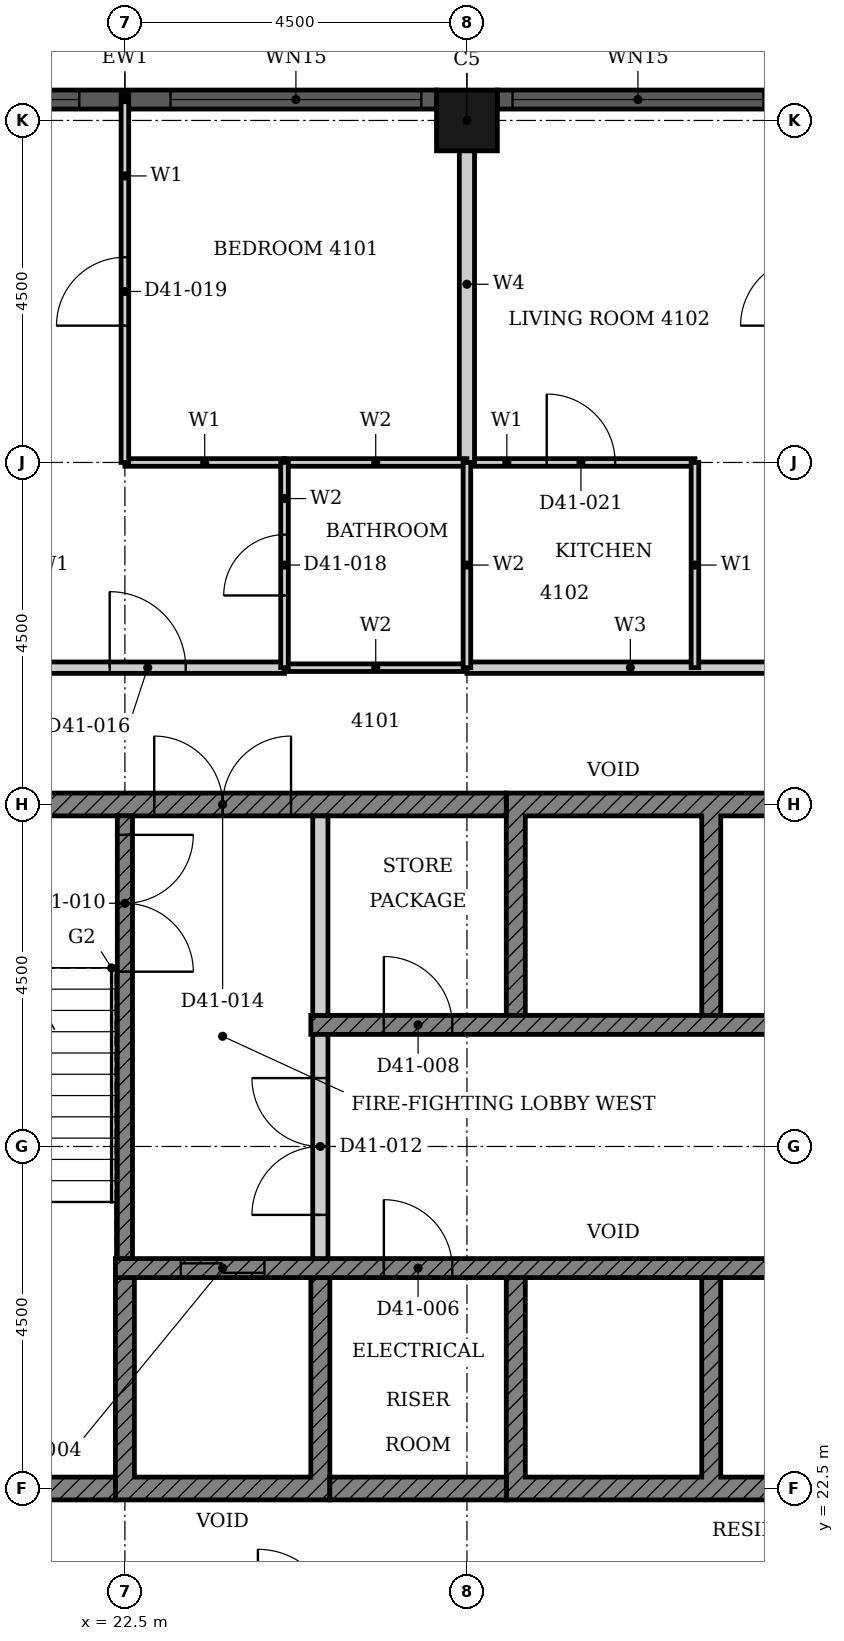
"""IFC4 building model, lengths in metres.
Left out: names, types, materials, properties, quantities, classifications, styles, units other than length and angle.
Written with IfcOpenShell. Run it as: python <this file> out.ifc"""

import sys

from ifc_helpers import new_model, si_unit, direction, frame, frame_2d, origin, origin_2d, place, context, subcontext, project, spatial, polyline, rectangle, hollow_rectangle, outline, extrude, element, fill, save


model = new_model("IFC4")
c1 = context("Model", 3, precision=1e-05, world=origin(), true_north=direction((0.0, 1.0)))
c2 = subcontext(c1, "Body", "Model", "MODEL_VIEW")
j1 = project(units=[si_unit("LENGTHUNIT", "METRE"), si_unit("PLANEANGLEUNIT", "RADIAN")], contexts=[c1])
p1 = place(None, origin())
s1 = spatial("IfcSite", under=j1, at=p1, CompositionType="ELEMENT")
p2 = place(p1, origin())
s2 = spatial("IfcBuilding", under=s1, at=p2, CompositionType="ELEMENT")
p3 = place(p2, frame((0.0, 0.0, 165.4)))
s3 = spatial("IfcBuildingStorey", under=s2, at=p3, CompositionType="ELEMENT", Elevation=165.4)
p4 = place(p3, frame((27.0, 40.5, 0.0), z_axis=(0.0, 0.0, 1.0), x_axis=(1.0, 0.0, 0.0)))
e1 = element("IfcColumn", 1, at=p4, inside=s3, PredefinedType="COLUMN", context=c2, shape_type="SweptSolid", body=[
    extrude(hollow_rectangle(XDim=0.8, YDim=0.8, WallThickness=0.025, at=origin_2d()), origin(), (0.0, 0.0, 1.0), 3.7),
])
p5 = place(p3, frame((35.6, 40.775, 0.0), z_axis=(0.0, 0.0, 1.0), x_axis=(-1.0, 0.0, 0.0)))
e2 = element("IfcWall", 2, at=p5, inside=s3, PredefinedType="SOLIDWALL", context=c2, shape_type="SweptSolid", body=[
    extrude(rectangle(XDim=8.2, YDim=0.25, at=frame_2d((4.1, 0.0))), origin(), (0.0, 0.0, 1.0), 3.7),
])
p6 = place(p5, frame((0.2, 0.0, 0.45)))
e3 = element("IfcOpeningElement", 3, at=p6, cuts=e2, PredefinedType="OPENING", context=c2, shape_type="SweptSolid", body=[
    extrude(rectangle(XDim=3.3, YDim=2.3, at=frame_2d((1.65, 1.15))), frame((0.0, 0.135, 0.0), z_axis=(0.0, -1.0, 0.0), x_axis=(1.0, 0.0, 0.0)), (0.0, 0.0, 1.0), 0.27),
])
p7 = place(p5, frame((4.7, 0.0, 0.45)))
e4 = element("IfcOpeningElement", 4, at=p7, cuts=e2, PredefinedType="OPENING", context=c2, shape_type="SweptSolid", body=[
    extrude(rectangle(XDim=3.3, YDim=2.3, at=frame_2d((1.65, 1.15))), frame((0.0, 0.135, 0.0), z_axis=(0.0, -1.0, 0.0), x_axis=(1.0, 0.0, 0.0)), (0.0, 0.0, 1.0), 0.27),
])
p8 = place(p3, frame((26.6, 40.775, 0.0), z_axis=(0.0, 0.0, 1.0), x_axis=(-1.0, 0.0, 0.0)))
e5 = element("IfcWall", 5, at=p8, inside=s3, PredefinedType="SOLIDWALL", context=c2, shape_type="SweptSolid", body=[
    extrude(rectangle(XDim=8.2, YDim=0.25, at=frame_2d((4.1, 0.0))), origin(), (0.0, 0.0, 1.0), 3.7),
])
p9 = place(p8, frame((0.2, 0.0, 0.45)))
e6 = element("IfcOpeningElement", 6, at=p9, cuts=e5, PredefinedType="OPENING", context=c2, shape_type="SweptSolid", body=[
    extrude(rectangle(XDim=3.3, YDim=2.3, at=frame_2d((1.65, 1.15))), frame((0.0, 0.135, 0.0), z_axis=(0.0, -1.0, 0.0), x_axis=(1.0, 0.0, 0.0)), (0.0, 0.0, 1.0), 0.27),
])
p10 = place(p8, frame((4.7, 0.0, 0.45)))
e7 = element("IfcOpeningElement", 7, at=p10, cuts=e5, PredefinedType="OPENING", context=c2, shape_type="SweptSolid", body=[
    extrude(rectangle(XDim=3.3, YDim=2.3, at=frame_2d((1.65, 1.15))), frame((0.0, 0.135, 0.0), z_axis=(0.0, -1.0, 0.0), x_axis=(1.0, 0.0, 0.0)), (0.0, 0.0, 1.0), 0.27),
])
p11 = place(p3, origin())
e8 = element("IfcWall", 8, at=p11, inside=s3, PredefinedType="SHEAR", context=c2, shape_type="SweptSolid", body=[
    extrude(outline(polyline([(22.375, 22.35), (25.197, 22.35), (25.197, 25.275), (24.947, 25.275), (24.947, 22.65), (22.625, 22.65), (22.625, 25.275), (22.375, 25.275), (22.375, 22.35)])), origin(), (0.0, 0.0, 1.0), 3.4),
])
p12 = place(p3, origin())
e9 = element("IfcWall", 9, at=p12, inside=s3, PredefinedType="SHEAR", context=c2, shape_type="SweptSolid", body=[
    extrude(outline(polyline([(27.518, 22.35), (32.911, 22.35), (32.911, 25.275), (32.661, 25.275), (32.661, 22.65), (30.339, 22.65), (30.339, 25.275), (30.089, 25.275), (30.089, 22.65), (27.768, 22.65), (27.768, 25.275), (27.518, 25.275), (27.518, 22.35)])), origin(), (0.0, 0.0, 1.0), 3.4),
])
p13 = place(p3, origin())
e10 = element("IfcWall", 10, at=p13, inside=s3, PredefinedType="SHEAR", context=c2, shape_type="SweptSolid", body=[
    extrude(outline(polyline([(27.518, 28.725), (27.768, 28.725), (27.768, 31.35), (30.089, 31.35), (30.089, 28.725), (30.339, 28.725), (30.339, 31.35), (32.661, 31.35), (32.661, 28.725), (32.911, 28.725), (32.911, 31.65), (27.518, 31.65), (27.518, 28.725)])), origin(), (0.0, 0.0, 1.0), 3.4),
])
p14 = place(p3, frame((18.15, 22.5, 0.0), z_axis=(0.0, 0.0, 1.0), x_axis=(1.0, 0.0, 0.0)))
e11 = element("IfcWall", 11, at=p14, inside=s3, PredefinedType="SHEAR", context=c2, shape_type="SweptSolid", body=[
    extrude(rectangle(XDim=4.225, YDim=0.3, at=frame_2d((2.113, 0.0))), origin(), (0.0, 0.0, 1.0), 3.4),
])
p15 = place(p3, frame((25.197, 22.5, 0.0), z_axis=(0.0, 0.0, 1.0), x_axis=(1.0, 0.0, 0.0)))
e12 = element("IfcWall", 12, at=p15, inside=s3, PredefinedType="SHEAR", context=c2, shape_type="SweptSolid", body=[
    extrude(rectangle(XDim=2.321, YDim=0.3, at=frame_2d((1.161, 0.0))), origin(), (0.0, 0.0, 1.0), 3.4),
])
p16 = place(p3, frame((18.15, 31.5, 0.0), z_axis=(0.0, 0.0, 1.0), x_axis=(1.0, 0.0, 0.0)))
e13 = element("IfcWall", 13, at=p16, inside=s3, PredefinedType="SHEAR", context=c2, shape_type="SweptSolid", body=[
    extrude(rectangle(XDim=9.368, YDim=0.3, at=frame_2d((4.684, 0.0))), origin(), (0.0, 0.0, 1.0), 3.4),
])
p17 = place(p16, frame((4.736, 0.0, 0.0)))
e14 = element("IfcOpeningElement", 14, at=p17, cuts=e13, PredefinedType="OPENING", context=c2, shape_type="SweptSolid", body=[
    extrude(rectangle(XDim=1.8, YDim=2.1, at=frame_2d((0.9, 1.05))), frame((0.0, 0.16, 0.0), z_axis=(0.0, -1.0, 0.0), x_axis=(1.0, 0.0, 0.0)), (0.0, 0.0, 1.0), 0.32),
])
p18 = place(p3, frame((22.375, 25.4, 0.0), z_axis=(0.0, 0.0, 1.0), x_axis=(1.0, 0.0, 0.0)))
e15 = element("IfcWall", 15, at=p18, inside=s3, PredefinedType="SHEAR", context=c2, shape_type="SweptSolid", body=[
    extrude(rectangle(XDim=15.678, YDim=0.25, at=frame_2d((7.839, 0.0))), origin(), (0.0, 0.0, 1.0), 3.4),
])
p19 = place(p18, frame((8.575, 0.0, 0.0)))
e16 = element("IfcOpeningElement", 16, at=p19, cuts=e15, PredefinedType="OPENING", context=c2, shape_type="SweptSolid", body=[
    extrude(rectangle(XDim=1.1, YDim=2.1, at=frame_2d((0.55, 1.05))), frame((0.0, 0.135, 0.0), z_axis=(0.0, -1.0, 0.0), x_axis=(1.0, 0.0, 0.0)), (0.0, 0.0, 1.0), 0.27),
])
p20 = place(p18, frame((0.861, 0.0, 0.0)))
e17 = element("IfcOpeningElement", 17, at=p20, cuts=e15, PredefinedType="OPENING", context=c2, shape_type="SweptSolid", body=[
    extrude(rectangle(XDim=1.1, YDim=2.1, at=frame_2d((0.55, 1.05))), frame((0.0, 0.135, 0.0), z_axis=(0.0, -1.0, 0.0), x_axis=(1.0, 0.0, 0.0)), (0.0, 0.0, 1.0), 0.27),
])
p21 = place(p18, frame((3.532, 0.0, 0.0)))
e18 = element("IfcOpeningElement", 18, at=p21, cuts=e15, PredefinedType="OPENING", context=c2, shape_type="SweptSolid", body=[
    extrude(rectangle(XDim=0.9, YDim=2.1, at=frame_2d((0.45, 1.05))), frame((0.0, 0.135, 0.0), z_axis=(0.0, -1.0, 0.0), x_axis=(1.0, 0.0, 0.0)), (0.0, 0.0, 1.0), 0.27),
])
p22 = place(p18, frame((12.532, 0.0, 0.0)))
e19 = element("IfcOpeningElement", 19, at=p22, cuts=e15, PredefinedType="OPENING", context=c2, shape_type="SweptSolid", body=[
    extrude(rectangle(XDim=0.9, YDim=2.1, at=frame_2d((0.45, 1.05))), frame((0.0, 0.135, 0.0), z_axis=(0.0, -1.0, 0.0), x_axis=(1.0, 0.0, 0.0)), (0.0, 0.0, 1.0), 0.27),
])
p23 = place(p3, frame((24.947, 28.6, 0.0), z_axis=(0.0, 0.0, 1.0), x_axis=(1.0, 0.0, 0.0)))
e20 = element("IfcWall", 20, at=p23, inside=s3, PredefinedType="SHEAR", context=c2, shape_type="SweptSolid", body=[
    extrude(rectangle(XDim=15.678, YDim=0.25, at=frame_2d((7.839, 0.0))), origin(), (0.0, 0.0, 1.0), 3.4),
])
p24 = place(p23, frame((6.004, 0.0, 0.0)))
e21 = element("IfcOpeningElement", 21, at=p24, cuts=e20, PredefinedType="OPENING", context=c2, shape_type="SweptSolid", body=[
    extrude(rectangle(XDim=1.1, YDim=2.1, at=frame_2d((0.55, 1.05))), frame((0.0, 0.135, 0.0), z_axis=(0.0, -1.0, 0.0), x_axis=(1.0, 0.0, 0.0)), (0.0, 0.0, 1.0), 0.27),
])
p25 = place(p23, frame((11.146, 0.0, 0.0)))
e22 = element("IfcOpeningElement", 22, at=p25, cuts=e20, PredefinedType="OPENING", context=c2, shape_type="SweptSolid", body=[
    extrude(rectangle(XDim=1.1, YDim=2.1, at=frame_2d((0.55, 1.05))), frame((0.0, 0.135, 0.0), z_axis=(0.0, -1.0, 0.0), x_axis=(1.0, 0.0, 0.0)), (0.0, 0.0, 1.0), 0.27),
])
p26 = place(p23, frame((13.718, 0.0, 0.0)))
e23 = element("IfcOpeningElement", 23, at=p26, cuts=e20, PredefinedType="OPENING", context=c2, shape_type="SweptSolid", body=[
    extrude(rectangle(XDim=1.1, YDim=2.1, at=frame_2d((0.55, 1.05))), frame((0.0, 0.135, 0.0), z_axis=(0.0, -1.0, 0.0), x_axis=(1.0, 0.0, 0.0)), (0.0, 0.0, 1.0), 0.27),
])
p27 = place(p23, frame((0.961, 0.0, 0.0)))
e24 = element("IfcOpeningElement", 24, at=p27, cuts=e20, PredefinedType="OPENING", context=c2, shape_type="SweptSolid", body=[
    extrude(rectangle(XDim=0.9, YDim=2.1, at=frame_2d((0.45, 1.05))), frame((0.0, 0.135, 0.0), z_axis=(0.0, -1.0, 0.0), x_axis=(1.0, 0.0, 0.0)), (0.0, 0.0, 1.0), 0.27),
])
p28 = place(p23, frame((8.675, 0.0, 0.0)))
e25 = element("IfcOpeningElement", 25, at=p28, cuts=e20, PredefinedType="OPENING", context=c2, shape_type="SweptSolid", body=[
    extrude(rectangle(XDim=0.9, YDim=2.1, at=frame_2d((0.45, 1.05))), frame((0.0, 0.135, 0.0), z_axis=(0.0, -1.0, 0.0), x_axis=(1.0, 0.0, 0.0)), (0.0, 0.0, 1.0), 0.27),
])
p29 = place(p3, frame((25.072, 28.725, 0.0), z_axis=(0.0, 0.0, 1.0), x_axis=(0.0, 1.0, 0.0)))
e26 = element("IfcWall", 26, at=p29, inside=s3, PredefinedType="PARTITIONING", context=c2, shape_type="SweptSolid", body=[
    extrude(rectangle(XDim=2.625, YDim=0.2, at=frame_2d((1.312, 0.0))), origin(), (0.0, 0.0, 1.0), 3.4),
])
p30 = place(p3, frame((22.5, 31.35, 0.0), z_axis=(0.0, 0.0, 1.0), x_axis=(0.0, -1.0, 0.0)))
e27 = element("IfcWall", 27, at=p30, inside=s3, PredefinedType="SHEAR", context=c2, shape_type="SweptSolid", body=[
    extrude(rectangle(XDim=5.825, YDim=0.2, at=frame_2d((2.913, 0.0))), origin(), (0.0, 0.0, 1.0), 3.4),
])
p31 = place(p30, frame((0.25, 0.0, 0.0)))
e28 = element("IfcOpeningElement", 28, at=p31, cuts=e27, PredefinedType="OPENING", context=c2, shape_type="SweptSolid", body=[
    extrude(rectangle(XDim=1.8, YDim=2.1, at=frame_2d((0.9, 1.05))), frame((0.0, 0.11, 0.0), z_axis=(0.0, -1.0, 0.0), x_axis=(1.0, 0.0, 0.0)), (0.0, 0.0, 1.0), 0.22),
])
p32 = place(p3, frame((25.072, 25.525, 0.0), z_axis=(0.0, 0.0, 1.0), x_axis=(0.0, 1.0, 0.0)))
e29 = element("IfcWall", 29, at=p32, inside=s3, PredefinedType="PARTITIONING", context=c2, shape_type="SweptSolid", body=[
    extrude(rectangle(XDim=2.95, YDim=0.2, at=frame_2d((1.475, 0.0))), origin(), (0.0, 0.0, 1.0), 3.4),
])
p33 = place(p32, frame((0.575, 0.0, 0.0)))
e30 = element("IfcOpeningElement", 30, at=p33, cuts=e29, PredefinedType="OPENING", context=c2, shape_type="SweptSolid", body=[
    extrude(rectangle(XDim=1.8, YDim=2.1, at=frame_2d((0.9, 1.05))), frame((0.0, 0.11, 0.0), z_axis=(0.0, -1.0, 0.0), x_axis=(1.0, 0.0, 0.0)), (0.0, 0.0, 1.0), 0.22),
])
p34 = place(p3, frame((18.0, 33.3, 0.0), z_axis=(0.0, 0.0, 1.0), x_axis=(1.0, 0.0, 0.0)))
e31 = element("IfcWall", 31, at=p34, inside=s3, PredefinedType="PARTITIONING", context=c2, shape_type="SweptSolid", body=[
    extrude(rectangle(XDim=6.6, YDim=0.15, at=frame_2d((3.3, 0.0))), origin(), (0.0, 0.0, 1.0), 3.4),
])
p35 = place(p34, frame((4.3, 0.0, 0.0)))
e32 = element("IfcOpeningElement", 32, at=p35, cuts=e31, PredefinedType="OPENING", context=c2, shape_type="SweptSolid", body=[
    extrude(rectangle(XDim=1.0, YDim=2.2, at=frame_2d((0.5, 1.1))), frame((0.0, 0.085, 0.0), z_axis=(0.0, -1.0, 0.0), x_axis=(1.0, 0.0, 0.0)), (0.0, 0.0, 1.0), 0.17),
])
p36 = place(p3, frame((27.0, 33.3, 0.0), z_axis=(0.0, 0.0, 1.0), x_axis=(1.0, 0.0, 0.0)))
e33 = element("IfcWall", 33, at=p36, inside=s3, PredefinedType="PARTITIONING", context=c2, shape_type="SweptSolid", body=[
    extrude(rectangle(XDim=6.6, YDim=0.15, at=frame_2d((3.3, 0.0))), origin(), (0.0, 0.0, 1.0), 3.4),
])
p37 = place(p36, frame((4.3, 0.0, 0.0)))
e34 = element("IfcOpeningElement", 34, at=p37, cuts=e33, PredefinedType="OPENING", context=c2, shape_type="SweptSolid", body=[
    extrude(rectangle(XDim=1.0, YDim=2.2, at=frame_2d((0.5, 1.1))), frame((0.0, 0.085, 0.0), z_axis=(0.0, -1.0, 0.0), x_axis=(1.0, 0.0, 0.0)), (0.0, 0.0, 1.0), 0.17),
])
p38 = place(p3, frame((22.5, 36.0, 0.0), z_axis=(0.0, 0.0, 1.0), x_axis=(1.0, 0.0, 0.0)))
e35 = element("IfcWall", 35, at=p38, inside=s3, PredefinedType="PARTITIONING", context=c2, shape_type="SweptSolid", body=[
    extrude(rectangle(XDim=2.1, YDim=0.1, at=frame_2d((1.05, 0.0))), origin(), (0.0, 0.0, 1.0), 3.4),
])
p39 = place(p3, frame((27.0, 36.0, 0.0), z_axis=(0.0, 0.0, 1.0), x_axis=(1.0, 0.0, 0.0)))
e36 = element("IfcWall", 36, at=p39, inside=s3, PredefinedType="PARTITIONING", context=c2, shape_type="SweptSolid", body=[
    extrude(rectangle(XDim=3.0, YDim=0.1, at=frame_2d((1.5, 0.0))), origin(), (0.0, 0.0, 1.0), 3.4),
])
p40 = place(p39, frame((1.05, 0.0, 0.0)))
e37 = element("IfcOpeningElement", 37, at=p40, cuts=e36, PredefinedType="OPENING", context=c2, shape_type="SweptSolid", body=[
    extrude(rectangle(XDim=0.9, YDim=2.1, at=frame_2d((0.45, 1.05))), frame((0.0, 0.06, 0.0), z_axis=(0.0, -1.0, 0.0), x_axis=(1.0, 0.0, 0.0)), (0.0, 0.0, 1.0), 0.12),
])
p41 = place(p3, frame((22.5, 36.0, 0.0), z_axis=(0.0, 0.0, 1.0), x_axis=(0.0, 1.0, 0.0)))
e38 = element("IfcWall", 38, at=p41, inside=s3, PredefinedType="PARTITIONING", context=c2, shape_type="SweptSolid", body=[
    extrude(rectangle(XDim=4.84, YDim=0.1, at=frame_2d((2.42, 0.0))), origin(), (0.0, 0.0, 1.0), 3.4),
])
p42 = place(p41, frame((1.8, 0.0, 0.0)))
e39 = element("IfcOpeningElement", 39, at=p42, cuts=e38, PredefinedType="OPENING", context=c2, shape_type="SweptSolid", body=[
    extrude(rectangle(XDim=0.9, YDim=2.1, at=frame_2d((0.45, 1.05))), frame((0.0, 0.06, 0.0), z_axis=(0.0, -1.0, 0.0), x_axis=(1.0, 0.0, 0.0)), (0.0, 0.0, 1.0), 0.12),
])
p43 = place(p3, frame((30.0, 33.3, 0.0), z_axis=(0.0, 0.0, 1.0), x_axis=(0.0, 1.0, 0.0)))
e40 = element("IfcWall", 40, at=p43, inside=s3, PredefinedType="PARTITIONING", context=c2, shape_type="SweptSolid", body=[
    extrude(rectangle(XDim=2.7, YDim=0.1, at=frame_2d((1.35, 0.0))), origin(), (0.0, 0.0, 1.0), 3.4),
])
p44 = place(p3, frame((27.0, 36.0, 0.0), z_axis=(0.0, 0.0, 1.0), x_axis=(0.0, 1.0, 0.0)))
e41 = element("IfcWall", 41, at=p44, inside=s3, PredefinedType="PARTITIONING", context=c2, shape_type="SweptSolid", body=[
    extrude(rectangle(XDim=4.69, YDim=0.2, at=frame_2d((2.345, 0.0))), origin(), (0.0, 0.0, 1.0), 3.4),
])
for number, where, z_axis, x_axis in (
    (42, (24.6, 33.3, 0.0), (0.0, 0.0, 1.0), (1.0, 0.0, 0.0)),
    (43, (24.6, 36.0, 0.0), (0.0, 0.0, 1.0), (1.0, 0.0, 0.0)),
):
    element("IfcWall", number, at=place(p3, frame(where, z_axis=z_axis, x_axis=x_axis)), inside=s3, PredefinedType="PARTITIONING", context=c2, shape_type="SweptSolid", body=[
        extrude(rectangle(XDim=2.4, YDim=0.1, at=frame_2d((1.2, 0.0))), origin(), (0.0, 0.0, 1.0), 3.4),
    ])
p45 = place(p3, frame((24.6, 33.3, 0.0), z_axis=(0.0, 0.0, 1.0), x_axis=(0.0, 1.0, 0.0)))
e44 = element("IfcWall", 44, at=p45, inside=s3, PredefinedType="PARTITIONING", context=c2, shape_type="SweptSolid", body=[
    extrude(rectangle(XDim=2.7, YDim=0.1, at=frame_2d((1.35, 0.0))), origin(), (0.0, 0.0, 1.0), 3.4),
])
p46 = place(p45, frame((0.95, 0.0, 0.0)))
e45 = element("IfcOpeningElement", 45, at=p46, cuts=e44, PredefinedType="OPENING", context=c2, shape_type="SweptSolid", body=[
    extrude(rectangle(XDim=0.8, YDim=2.1, at=frame_2d((0.4, 1.05))), frame((0.0, 0.06, 0.0), z_axis=(0.0, -1.0, 0.0), x_axis=(1.0, 0.0, 0.0)), (0.0, 0.0, 1.0), 0.12),
])
p47 = place(p3, frame((27.0, 33.3, 0.0), z_axis=(0.0, 0.0, 1.0), x_axis=(0.0, 1.0, 0.0)))
e46 = element("IfcWall", 46, at=p47, inside=s3, PredefinedType="PARTITIONING", context=c2, shape_type="SweptSolid", body=[
    extrude(rectangle(XDim=2.7, YDim=0.1, at=frame_2d((1.35, 0.0))), origin(), (0.0, 0.0, 1.0), 3.4),
])
p48 = place(p7, origin())
e47 = element("IfcWindow", 47, at=p48, inside=s3, PartitioningType="SINGLE_PANEL", PredefinedType="WINDOW", context=c2, shape_type="SweptSolid", body=[
    extrude(rectangle(XDim=3.3, YDim=2.3, at=frame_2d((1.65, 1.15))), frame((0.0, 0.03, 0.0), z_axis=(0.0, -1.0, 0.0), x_axis=(1.0, 0.0, 0.0)), (0.0, 0.0, 1.0), 0.06),
])
fill(e4, e47)
p49 = place(p9, origin())
e48 = element("IfcWindow", 48, at=p49, inside=s3, PartitioningType="SINGLE_PANEL", PredefinedType="WINDOW", context=c2, shape_type="SweptSolid", body=[
    extrude(rectangle(XDim=3.3, YDim=2.3, at=frame_2d((1.65, 1.15))), frame((0.0, 0.03, 0.0), z_axis=(0.0, -1.0, 0.0), x_axis=(1.0, 0.0, 0.0)), (0.0, 0.0, 1.0), 0.06),
])
fill(e6, e48)
p50 = place(p10, origin())
e49 = element("IfcWindow", 49, at=p50, inside=s3, PartitioningType="SINGLE_PANEL", PredefinedType="WINDOW", context=c2, shape_type="SweptSolid", body=[
    extrude(rectangle(XDim=3.3, YDim=2.3, at=frame_2d((1.65, 1.15))), frame((0.0, 0.03, 0.0), z_axis=(0.0, -1.0, 0.0), x_axis=(1.0, 0.0, 0.0)), (0.0, 0.0, 1.0), 0.06),
])
fill(e7, e49)
p51 = place(p20, origin())
e50 = element("IfcDoor", 50, at=p51, inside=s3, OperationType="DOUBLE_DOOR_SLIDING", PredefinedType="DOOR", context=c2, shape_type="SweptSolid", body=[
    extrude(rectangle(XDim=1.1, YDim=2.1, at=frame_2d((0.55, 1.05))), frame((0.0, 0.025, 0.0), z_axis=(0.0, -1.0, 0.0), x_axis=(1.0, 0.0, 0.0)), (0.0, 0.0, 1.0), 0.05),
])
fill(e17, e50)
p52 = place(p21, origin())
e51 = element("IfcDoor", 51, at=p52, inside=s3, OperationType="SINGLE_SWING_LEFT", PredefinedType="DOOR", context=c2, shape_type="SweptSolid", body=[
    extrude(rectangle(XDim=0.9, YDim=2.1, at=frame_2d((0.45, 1.05))), frame((0.0, 0.025, 0.0), z_axis=(0.0, -1.0, 0.0), x_axis=(1.0, 0.0, 0.0)), (0.0, 0.0, 1.0), 0.05),
])
fill(e18, e51)
p53 = place(p27, origin())
e52 = element("IfcDoor", 52, at=p53, inside=s3, OperationType="SINGLE_SWING_LEFT", PredefinedType="DOOR", context=c2, shape_type="SweptSolid", body=[
    extrude(rectangle(XDim=0.9, YDim=2.1, at=frame_2d((0.45, 1.05))), frame((0.0, 0.025, 0.0), z_axis=(0.0, -1.0, 0.0), x_axis=(1.0, 0.0, 0.0)), (0.0, 0.0, 1.0), 0.05),
])
fill(e24, e52)
p54 = place(p31, origin())
e53 = element("IfcDoor", 53, at=p54, inside=s3, OperationType="DOUBLE_DOOR_SINGLE_SWING", PredefinedType="DOOR", context=c2, shape_type="SweptSolid", body=[
    extrude(rectangle(XDim=1.8, YDim=2.1, at=frame_2d((0.9, 1.05))), frame((0.0, 0.025, 0.0), z_axis=(0.0, -1.0, 0.0), x_axis=(1.0, 0.0, 0.0)), (0.0, 0.0, 1.0), 0.05),
])
fill(e28, e53)
p55 = place(p33, origin())
e54 = element("IfcDoor", 54, at=p55, inside=s3, OperationType="DOUBLE_DOOR_SINGLE_SWING", PredefinedType="DOOR", context=c2, shape_type="SweptSolid", body=[
    extrude(rectangle(XDim=1.8, YDim=2.1, at=frame_2d((0.9, 1.05))), frame((0.0, 0.025, 0.0), z_axis=(0.0, -1.0, 0.0), x_axis=(1.0, 0.0, 0.0)), (0.0, 0.0, 1.0), 0.05),
])
fill(e30, e54)
p56 = place(p17, origin())
e55 = element("IfcDoor", 55, at=p56, inside=s3, OperationType="DOUBLE_DOOR_SINGLE_SWING", PredefinedType="DOOR", context=c2, shape_type="SweptSolid", body=[
    extrude(rectangle(XDim=1.8, YDim=2.1, at=frame_2d((0.9, 1.05))), frame((0.0, 0.025, 0.0), z_axis=(0.0, -1.0, 0.0), x_axis=(1.0, 0.0, 0.0)), (0.0, 0.0, 1.0), 0.05),
])
fill(e14, e55)
p57 = place(p35, origin())
e56 = element("IfcDoor", 56, at=p57, inside=s3, OperationType="SINGLE_SWING_RIGHT", PredefinedType="DOOR", context=c2, shape_type="SweptSolid", body=[
    extrude(rectangle(XDim=1.0, YDim=2.2, at=frame_2d((0.5, 1.1))), frame((0.0, 0.025, 0.0), z_axis=(0.0, -1.0, 0.0), x_axis=(1.0, 0.0, 0.0)), (0.0, 0.0, 1.0), 0.05),
])
fill(e32, e56)
p58 = place(p46, origin())
e57 = element("IfcDoor", 57, at=p58, inside=s3, OperationType="SINGLE_SWING_LEFT", PredefinedType="DOOR", context=c2, shape_type="SweptSolid", body=[
    extrude(rectangle(XDim=0.8, YDim=2.1, at=frame_2d((0.4, 1.05))), frame((0.0, 0.025, 0.0), z_axis=(0.0, -1.0, 0.0), x_axis=(1.0, 0.0, 0.0)), (0.0, 0.0, 1.0), 0.05),
])
fill(e45, e57)
p59 = place(p42, origin())
e58 = element("IfcDoor", 58, at=p59, inside=s3, OperationType="SINGLE_SWING_LEFT", PredefinedType="DOOR", context=c2, shape_type="SweptSolid", body=[
    extrude(rectangle(XDim=0.9, YDim=2.1, at=frame_2d((0.45, 1.05))), frame((0.0, 0.025, 0.0), z_axis=(0.0, -1.0, 0.0), x_axis=(1.0, 0.0, 0.0)), (0.0, 0.0, 1.0), 0.05),
])
fill(e39, e58)
p60 = place(p40, origin())
e59 = element("IfcDoor", 59, at=p60, inside=s3, OperationType="SINGLE_SWING_LEFT", PredefinedType="DOOR", context=c2, shape_type="SweptSolid", body=[
    extrude(rectangle(XDim=0.9, YDim=2.1, at=frame_2d((0.45, 1.05))), frame((0.0, 0.025, 0.0), z_axis=(0.0, -1.0, 0.0), x_axis=(1.0, 0.0, 0.0)), (0.0, 0.0, 1.0), 0.05),
])
fill(e37, e59)
save(model, sys.argv[1])
